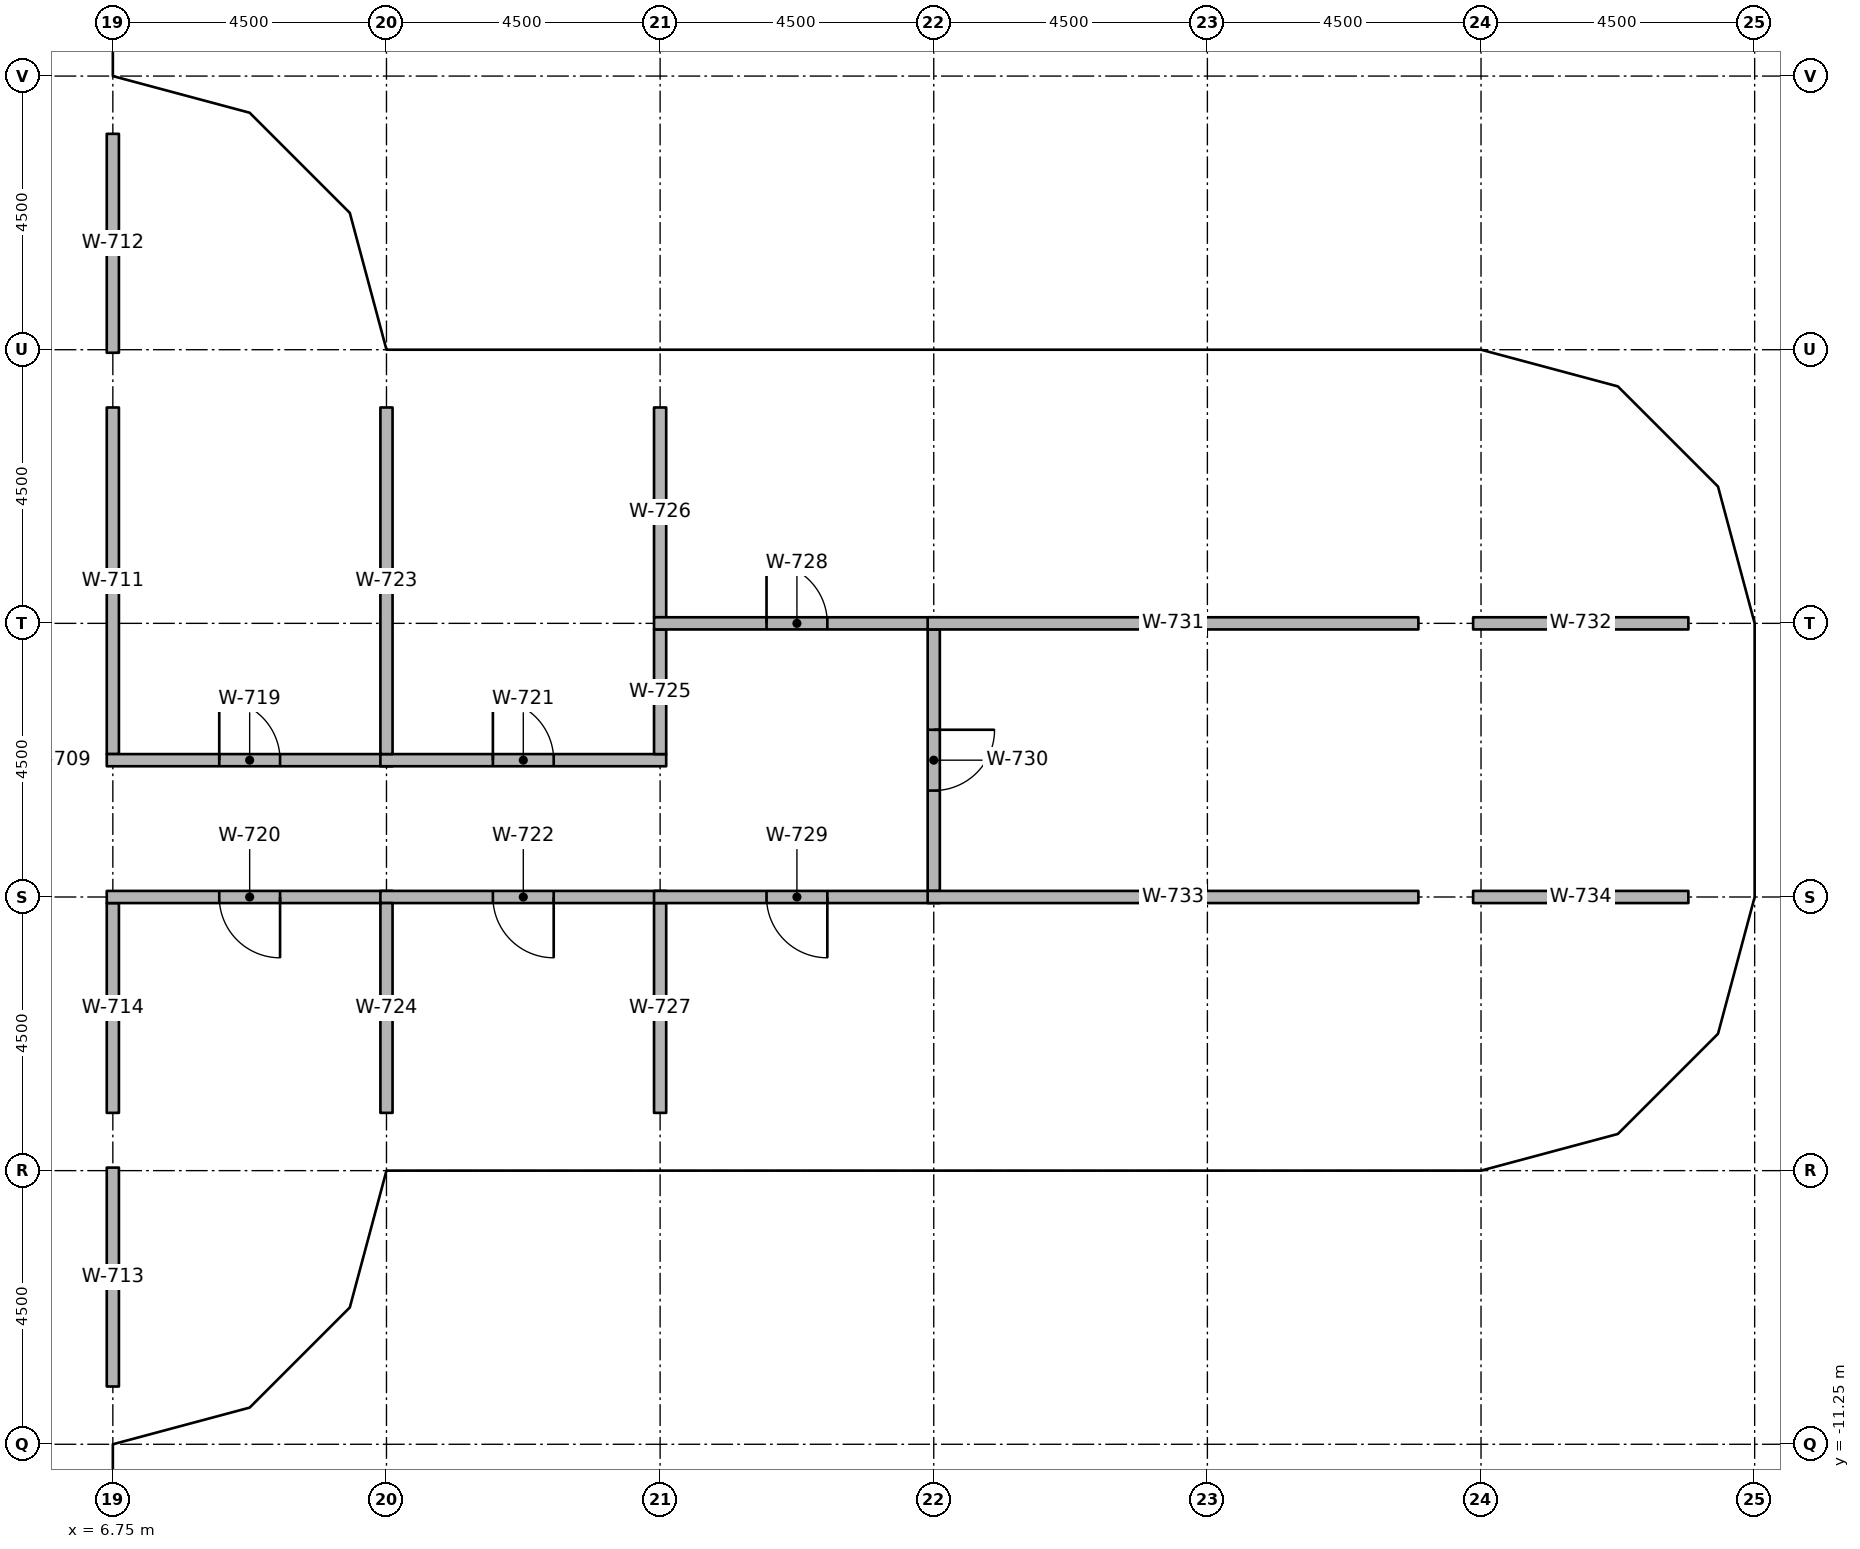
"""IFC4 building model, lengths in metres.
Left out: names, types, materials, properties, quantities, classifications, styles, units other than length and angle.
Written with IfcOpenShell. Run it as: python <this file> out.ifc"""

import sys

from ifc_helpers import new_model, si_unit, direction, frame, frame_2d, origin, origin_2d, place, context, subcontext, project, spatial, rectangle, extrude, element, fill, save


model = new_model("IFC4")
c1 = context("Model", 3, precision=1e-05, world=origin(), true_north=direction((0.0, 1.0)))
c2 = subcontext(c1, "Body", "Model", "MODEL_VIEW")
j1 = project(units=[si_unit("LENGTHUNIT", "METRE"), si_unit("PLANEANGLEUNIT", "RADIAN")], contexts=[c1])
p1 = place(None, origin())
s1 = spatial("IfcSite", under=j1, at=p1, CompositionType="ELEMENT")
p2 = place(p1, origin())
s2 = spatial("IfcBuilding", under=s1, at=p2, CompositionType="ELEMENT")
p3 = place(p2, frame((0.0, 0.0, 94.2)))
s3 = spatial("IfcBuildingStorey", under=s2, at=p3, CompositionType="ELEMENT", Elevation=94.2)
for number, where, z_axis, x_axis in (
    (1, (6.25, -10.75, 0.0), (0.0, 0.0, 1.0), (1.0, 0.0, 0.0)),
    (2, (6.25, -6.25, 0.0), (0.0, 0.0, 1.0), (1.0, 0.0, 0.0)),
    (3, (6.25, 6.25, 0.0), (0.0, 0.0, 1.0), (1.0, 0.0, 0.0)),
    (4, (6.25, 10.75, 0.0), (0.0, 0.0, 1.0), (1.0, 0.0, 0.0)),
    (5, (10.75, -6.25, 0.0), (0.0, 0.0, 1.0), (1.0, 0.0, 0.0)),
    (6, (10.75, 6.25, 0.0), (0.0, 0.0, 1.0), (1.0, 0.0, 0.0)),
    (7, (15.75, -6.25, 0.0), (0.0, 0.0, 1.0), (1.0, 0.0, 0.0)),
    (8, (15.75, 6.25, 0.0), (0.0, 0.0, 1.0), (1.0, 0.0, 0.0)),
    (9, (20.25, -6.11, 0.0), (0.0, 0.0, 1.0), (1.0, 0.0, 0.0)),
    (10, (20.25, 6.11, 0.0), (0.0, 0.0, 1.0), (1.0, 0.0, 0.0)),
    (11, (24.75, -6.11, 0.0), (0.0, 0.0, 1.0), (1.0, 0.0, 0.0)),
    (12, (24.75, 6.11, 0.0), (0.0, 0.0, 1.0), (1.0, 0.0, 0.0)),
    (13, (28.908, -5.475, 0.0), (0.0, 0.0, 1.0), (1.0, 0.0, 0.0)),
    (14, (28.67, -2.25, 0.0), (0.0, 0.0, 1.0), (1.0, 0.0, 0.0)),
    (15, (28.67, 2.25, 0.0), (0.0, 0.0, 1.0), (1.0, 0.0, 0.0)),
    (16, (28.908, 5.475, 0.0), (0.0, 0.0, 1.0), (1.0, 0.0, 0.0)),
    (17, (33.11, -2.25, 0.0), (0.0, 0.0, 1.0), (1.0, 0.0, 0.0)),
    (18, (33.11, 2.25, 0.0), (0.0, 0.0, 1.0), (1.0, 0.0, 0.0)),
):
    element("IfcColumn", number, at=place(p3, frame(where, z_axis=z_axis, x_axis=x_axis)), inside=s3, PredefinedType="COLUMN", context=c2, shape_type="SweptSolid", body=[
        extrude(rectangle(XDim=0.9, YDim=0.9, at=origin_2d()), origin(), (0.0, 0.0, 1.0), 3.65),
    ])
p4 = place(p3, frame((6.75, 0.1, 0.0), z_axis=(0.0, 0.0, 1.0), x_axis=(0.0, 1.0, 0.0)))
e19 = element("IfcWall", 19, at=p4, inside=s3, PredefinedType="PARTITIONING", context=c2, shape_type="SweptSolid", body=[
    extrude(rectangle(XDim=5.7, YDim=0.2, at=frame_2d((2.85, 0.0))), origin(), (0.0, 0.0, 1.0), 2.738),
])
for number, where, z_axis, x_axis in (
    (20, (6.75, 6.7, 0.0), (0.0, 0.0, 1.0), (0.0, 1.0, 0.0)),
    (21, (6.75, -10.3, 0.0), (0.0, 0.0, 1.0), (0.0, 1.0, 0.0)),
):
    element("IfcWall", number, at=place(p3, frame(where, z_axis=z_axis, x_axis=x_axis)), inside=s3, PredefinedType="PARTITIONING", context=c2, shape_type="SweptSolid", body=[
        extrude(rectangle(XDim=3.6, YDim=0.2, at=frame_2d((1.8, 0.0))), origin(), (0.0, 0.0, 1.0), 2.738),
    ])
p5 = place(p3, frame((6.75, -5.8, 0.0), z_axis=(0.0, 0.0, 1.0), x_axis=(0.0, 1.0, 0.0)))
e22 = element("IfcWall", 22, at=p5, inside=s3, PredefinedType="PARTITIONING", context=c2, shape_type="SweptSolid", body=[
    extrude(rectangle(XDim=3.45, YDim=0.2, at=frame_2d((1.725, 0.0))), origin(), (0.0, 0.0, 1.0), 2.738),
])
p6 = place(p3, frame((6.65, 0.0, 0.0), z_axis=(0.0, 0.0, 1.0), x_axis=(1.0, 0.0, 0.0)))
e23 = element("IfcWall", 23, at=p6, inside=s3, PredefinedType="PARTITIONING", context=c2, shape_type="SweptSolid", body=[
    extrude(rectangle(XDim=4.7, YDim=0.2, at=frame_2d((2.35, 0.0))), origin(), (0.0, 0.0, 1.0), 2.738),
])
p7 = place(p6, frame((1.85, 0.0, 0.0)))
e24 = element("IfcOpeningElement", 24, at=p7, cuts=e23, PredefinedType="OPENING", context=c2, shape_type="SweptSolid", body=[
    extrude(rectangle(XDim=1.0, YDim=2.1, at=frame_2d((0.5, 1.05))), frame((0.0, 0.11, 0.0), z_axis=(0.0, -1.0, 0.0), x_axis=(1.0, 0.0, 0.0)), (0.0, 0.0, 1.0), 0.22),
])
p8 = place(p3, frame((11.35, -2.25, 0.0), z_axis=(0.0, 0.0, 1.0), x_axis=(-1.0, 0.0, 0.0)))
e25 = element("IfcWall", 25, at=p8, inside=s3, PredefinedType="PARTITIONING", context=c2, shape_type="SweptSolid", body=[
    extrude(rectangle(XDim=4.7, YDim=0.2, at=frame_2d((2.35, 0.0))), origin(), (0.0, 0.0, 1.0), 2.738),
])
p9 = place(p8, frame((1.85, 0.0, 0.0)))
e26 = element("IfcOpeningElement", 26, at=p9, cuts=e25, PredefinedType="OPENING", context=c2, shape_type="SweptSolid", body=[
    extrude(rectangle(XDim=1.0, YDim=2.1, at=frame_2d((0.5, 1.05))), frame((0.0, 0.11, 0.0), z_axis=(0.0, -1.0, 0.0), x_axis=(1.0, 0.0, 0.0)), (0.0, 0.0, 1.0), 0.22),
])
p10 = place(p3, frame((11.15, 0.0, 0.0), z_axis=(0.0, 0.0, 1.0), x_axis=(1.0, 0.0, 0.0)))
e27 = element("IfcWall", 27, at=p10, inside=s3, PredefinedType="PARTITIONING", context=c2, shape_type="SweptSolid", body=[
    extrude(rectangle(XDim=4.7, YDim=0.2, at=frame_2d((2.35, 0.0))), origin(), (0.0, 0.0, 1.0), 2.738),
])
p11 = place(p10, frame((1.85, 0.0, 0.0)))
e28 = element("IfcOpeningElement", 28, at=p11, cuts=e27, PredefinedType="OPENING", context=c2, shape_type="SweptSolid", body=[
    extrude(rectangle(XDim=1.0, YDim=2.1, at=frame_2d((0.5, 1.05))), frame((0.0, 0.11, 0.0), z_axis=(0.0, -1.0, 0.0), x_axis=(1.0, 0.0, 0.0)), (0.0, 0.0, 1.0), 0.22),
])
p12 = place(p3, frame((15.85, -2.25, 0.0), z_axis=(0.0, 0.0, 1.0), x_axis=(-1.0, 0.0, 0.0)))
e29 = element("IfcWall", 29, at=p12, inside=s3, PredefinedType="PARTITIONING", context=c2, shape_type="SweptSolid", body=[
    extrude(rectangle(XDim=4.7, YDim=0.2, at=frame_2d((2.35, 0.0))), origin(), (0.0, 0.0, 1.0), 2.738),
])
p13 = place(p12, frame((1.85, 0.0, 0.0)))
e30 = element("IfcOpeningElement", 30, at=p13, cuts=e29, PredefinedType="OPENING", context=c2, shape_type="SweptSolid", body=[
    extrude(rectangle(XDim=1.0, YDim=2.1, at=frame_2d((0.5, 1.05))), frame((0.0, 0.11, 0.0), z_axis=(0.0, -1.0, 0.0), x_axis=(1.0, 0.0, 0.0)), (0.0, 0.0, 1.0), 0.22),
])
p14 = place(p3, frame((11.25, 0.1, 0.0), z_axis=(0.0, 0.0, 1.0), x_axis=(0.0, 1.0, 0.0)))
e31 = element("IfcWall", 31, at=p14, inside=s3, PredefinedType="PARTITIONING", context=c2, shape_type="SweptSolid", body=[
    extrude(rectangle(XDim=5.7, YDim=0.2, at=frame_2d((2.85, 0.0))), origin(), (0.0, 0.0, 1.0), 2.738),
])
p15 = place(p3, frame((11.25, -5.8, 0.0), z_axis=(0.0, 0.0, 1.0), x_axis=(0.0, 1.0, 0.0)))
e32 = element("IfcWall", 32, at=p15, inside=s3, PredefinedType="PARTITIONING", context=c2, shape_type="SweptSolid", body=[
    extrude(rectangle(XDim=3.45, YDim=0.2, at=frame_2d((1.725, 0.0))), origin(), (0.0, 0.0, 1.0), 2.738),
])
p16 = place(p3, frame((15.75, 0.1, 0.0), z_axis=(0.0, 0.0, 1.0), x_axis=(0.0, 1.0, 0.0)))
e33 = element("IfcWall", 33, at=p16, inside=s3, PredefinedType="PARTITIONING", context=c2, shape_type="SweptSolid", body=[
    extrude(rectangle(XDim=2.05, YDim=0.2, at=frame_2d((1.025, 0.0))), origin(), (0.0, 0.0, 1.0), 2.738),
])
for number, where, z_axis, x_axis in (
    (34, (15.75, 2.35, 0.0), (0.0, 0.0, 1.0), (0.0, 1.0, 0.0)),
    (35, (15.75, -5.8, 0.0), (0.0, 0.0, 1.0), (0.0, 1.0, 0.0)),
):
    element("IfcWall", number, at=place(p3, frame(where, z_axis=z_axis, x_axis=x_axis)), inside=s3, PredefinedType="PARTITIONING", context=c2, shape_type="SweptSolid", body=[
        extrude(rectangle(XDim=3.45, YDim=0.2, at=frame_2d((1.725, 0.0))), origin(), (0.0, 0.0, 1.0), 2.738),
    ])
p17 = place(p3, frame((15.65, 2.25, 0.0), z_axis=(0.0, 0.0, 1.0), x_axis=(1.0, 0.0, 0.0)))
e36 = element("IfcWall", 36, at=p17, inside=s3, PredefinedType="PARTITIONING", context=c2, shape_type="SweptSolid", body=[
    extrude(rectangle(XDim=4.7, YDim=0.2, at=frame_2d((2.35, 0.0))), origin(), (0.0, 0.0, 1.0), 2.738),
])
p18 = place(p17, frame((1.85, 0.0, 0.0)))
e37 = element("IfcOpeningElement", 37, at=p18, cuts=e36, PredefinedType="OPENING", context=c2, shape_type="SweptSolid", body=[
    extrude(rectangle(XDim=1.0, YDim=2.1, at=frame_2d((0.5, 1.05))), frame((0.0, 0.11, 0.0), z_axis=(0.0, -1.0, 0.0), x_axis=(1.0, 0.0, 0.0)), (0.0, 0.0, 1.0), 0.22),
])
p19 = place(p3, frame((20.35, -2.25, 0.0), z_axis=(0.0, 0.0, 1.0), x_axis=(-1.0, 0.0, 0.0)))
e38 = element("IfcWall", 38, at=p19, inside=s3, PredefinedType="PARTITIONING", context=c2, shape_type="SweptSolid", body=[
    extrude(rectangle(XDim=4.7, YDim=0.2, at=frame_2d((2.35, 0.0))), origin(), (0.0, 0.0, 1.0), 2.738),
])
p20 = place(p19, frame((1.85, 0.0, 0.0)))
e39 = element("IfcOpeningElement", 39, at=p20, cuts=e38, PredefinedType="OPENING", context=c2, shape_type="SweptSolid", body=[
    extrude(rectangle(XDim=1.0, YDim=2.1, at=frame_2d((0.5, 1.05))), frame((0.0, 0.11, 0.0), z_axis=(0.0, -1.0, 0.0), x_axis=(1.0, 0.0, 0.0)), (0.0, 0.0, 1.0), 0.22),
])
p21 = place(p3, frame((20.25, 2.15, 0.0), z_axis=(0.0, 0.0, 1.0), x_axis=(0.0, -1.0, 0.0)))
e40 = element("IfcWall", 40, at=p21, inside=s3, PredefinedType="PARTITIONING", context=c2, shape_type="SweptSolid", body=[
    extrude(rectangle(XDim=4.3, YDim=0.2, at=frame_2d((2.15, 0.0))), origin(), (0.0, 0.0, 1.0), 2.738),
])
p22 = place(p21, frame((1.65, 0.0, 0.0)))
e41 = element("IfcOpeningElement", 41, at=p22, cuts=e40, PredefinedType="OPENING", context=c2, shape_type="SweptSolid", body=[
    extrude(rectangle(XDim=1.0, YDim=2.1, at=frame_2d((0.5, 1.05))), frame((0.0, 0.11, 0.0), z_axis=(0.0, -1.0, 0.0), x_axis=(1.0, 0.0, 0.0)), (0.0, 0.0, 1.0), 0.22),
])
p23 = place(p3, frame((20.15, 2.25, 0.0), z_axis=(0.0, 0.0, 1.0), x_axis=(1.0, 0.0, 0.0)))
e42 = element("IfcWall", 42, at=p23, inside=s3, PredefinedType="PARTITIONING", context=c2, shape_type="SweptSolid", body=[
    extrude(rectangle(XDim=8.07, YDim=0.2, at=frame_2d((4.035, 0.0))), origin(), (0.0, 0.0, 1.0), 2.738),
])
p24 = place(p3, frame((29.12, 2.25, 0.0), z_axis=(0.0, 0.0, 1.0), x_axis=(1.0, 0.0, 0.0)))
e43 = element("IfcWall", 43, at=p24, inside=s3, PredefinedType="PARTITIONING", context=c2, shape_type="SweptSolid", body=[
    extrude(rectangle(XDim=3.54, YDim=0.2, at=frame_2d((1.77, 0.0))), origin(), (0.0, 0.0, 1.0), 2.738),
])
p25 = place(p3, frame((20.15, -2.25, 0.0), z_axis=(0.0, 0.0, 1.0), x_axis=(1.0, 0.0, 0.0)))
e44 = element("IfcWall", 44, at=p25, inside=s3, PredefinedType="PARTITIONING", context=c2, shape_type="SweptSolid", body=[
    extrude(rectangle(XDim=8.07, YDim=0.2, at=frame_2d((4.035, 0.0))), origin(), (0.0, 0.0, 1.0), 2.738),
])
p26 = place(p3, frame((29.12, -2.25, 0.0), z_axis=(0.0, 0.0, 1.0), x_axis=(1.0, 0.0, 0.0)))
e45 = element("IfcWall", 45, at=p26, inside=s3, PredefinedType="PARTITIONING", context=c2, shape_type="SweptSolid", body=[
    extrude(rectangle(XDim=3.54, YDim=0.2, at=frame_2d((1.77, 0.0))), origin(), (0.0, 0.0, 1.0), 2.738),
])
p27 = place(p22, origin())
e46 = element("IfcDoor", 46, at=p27, inside=s3, OperationType="SINGLE_SWING_RIGHT", PredefinedType="DOOR", context=c2, shape_type="SweptSolid", body=[
    extrude(rectangle(XDim=1.0, YDim=2.1, at=frame_2d((0.5, 1.05))), frame((0.0, 0.025, 0.0), z_axis=(0.0, -1.0, 0.0), x_axis=(1.0, 0.0, 0.0)), (0.0, 0.0, 1.0), 0.05),
])
fill(e41, e46)
p28 = place(p18, origin())
e47 = element("IfcDoor", 47, at=p28, inside=s3, OperationType="SINGLE_SWING_LEFT", PredefinedType="DOOR", context=c2, shape_type="SweptSolid", body=[
    extrude(rectangle(XDim=1.0, YDim=2.1, at=frame_2d((0.5, 1.05))), frame((0.0, 0.025, 0.0), z_axis=(0.0, -1.0, 0.0), x_axis=(1.0, 0.0, 0.0)), (0.0, 0.0, 1.0), 0.05),
])
fill(e37, e47)
p29 = place(p7, origin())
e48 = element("IfcDoor", 48, at=p29, inside=s3, OperationType="SINGLE_SWING_RIGHT", PredefinedType="DOOR", context=c2, shape_type="SweptSolid", body=[
    extrude(rectangle(XDim=1.0, YDim=2.1, at=frame_2d((0.5, 1.05))), frame((0.0, 0.025, 0.0), z_axis=(0.0, -1.0, 0.0), x_axis=(1.0, 0.0, 0.0)), (0.0, 0.0, 1.0), 0.05),
])
fill(e24, e48)
p30 = place(p11, origin())
e49 = element("IfcDoor", 49, at=p30, inside=s3, OperationType="SINGLE_SWING_RIGHT", PredefinedType="DOOR", context=c2, shape_type="SweptSolid", body=[
    extrude(rectangle(XDim=1.0, YDim=2.1, at=frame_2d((0.5, 1.05))), frame((0.0, 0.025, 0.0), z_axis=(0.0, -1.0, 0.0), x_axis=(1.0, 0.0, 0.0)), (0.0, 0.0, 1.0), 0.05),
])
fill(e28, e49)
p31 = place(p20, origin())
e50 = element("IfcDoor", 50, at=p31, inside=s3, OperationType="SINGLE_SWING_RIGHT", PredefinedType="DOOR", context=c2, shape_type="SweptSolid", body=[
    extrude(rectangle(XDim=1.0, YDim=2.1, at=frame_2d((0.5, 1.05))), frame((0.0, 0.025, 0.0), z_axis=(0.0, -1.0, 0.0), x_axis=(1.0, 0.0, 0.0)), (0.0, 0.0, 1.0), 0.05),
])
fill(e39, e50)
p32 = place(p9, origin())
e51 = element("IfcDoor", 51, at=p32, inside=s3, OperationType="SINGLE_SWING_RIGHT", PredefinedType="DOOR", context=c2, shape_type="SweptSolid", body=[
    extrude(rectangle(XDim=1.0, YDim=2.1, at=frame_2d((0.5, 1.05))), frame((0.0, 0.025, 0.0), z_axis=(0.0, -1.0, 0.0), x_axis=(1.0, 0.0, 0.0)), (0.0, 0.0, 1.0), 0.05),
])
fill(e26, e51)
p33 = place(p13, origin())
e52 = element("IfcDoor", 52, at=p33, inside=s3, OperationType="SINGLE_SWING_RIGHT", PredefinedType="DOOR", context=c2, shape_type="SweptSolid", body=[
    extrude(rectangle(XDim=1.0, YDim=2.1, at=frame_2d((0.5, 1.05))), frame((0.0, 0.025, 0.0), z_axis=(0.0, -1.0, 0.0), x_axis=(1.0, 0.0, 0.0)), (0.0, 0.0, 1.0), 0.05),
])
fill(e30, e52)
save(model, sys.argv[1])
